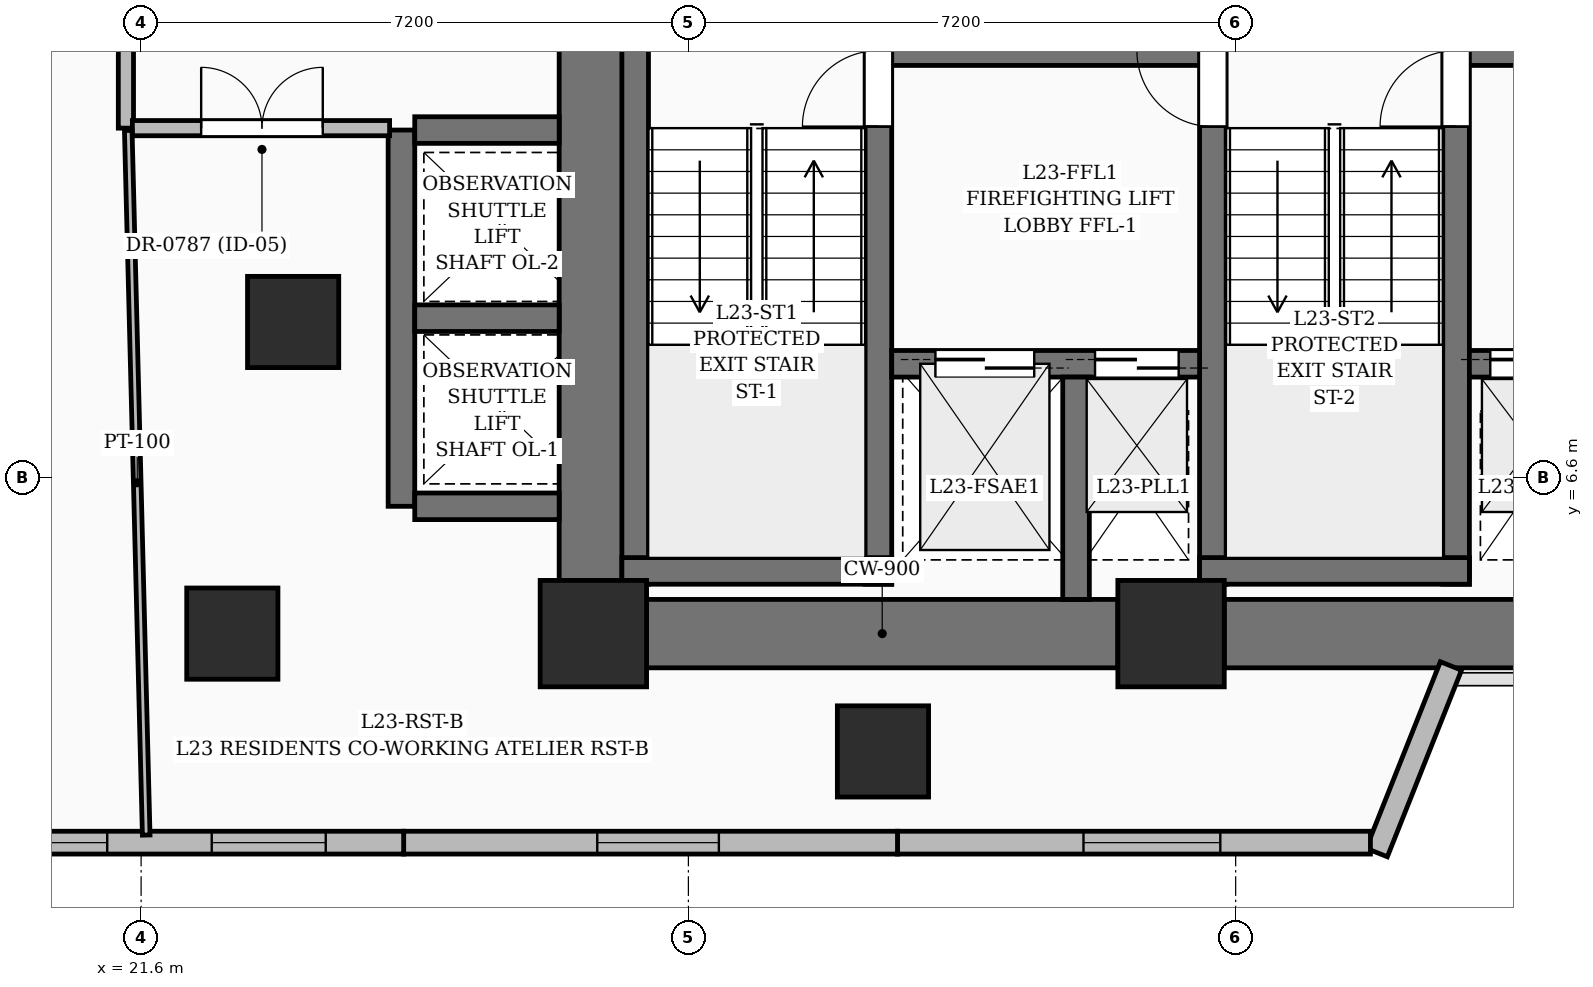
"""IFC4 building model, lengths in metres.
Left out: names, types, materials, properties, quantities, classifications, styles, units other than length and angle.
Written with IfcOpenShell. Run it as: python <this file> out.ifc"""

import sys

from ifc_helpers import new_model, si_unit, direction, frame, frame_2d, origin, origin_2d, place, context, subcontext, project, spatial, rectangle, extrude, element, fill, save


model = new_model("IFC4")
c1 = context("Model", 3, precision=1e-05, world=origin(), true_north=direction((0.0, 1.0)))
c2 = subcontext(c1, "Body", "Model", "MODEL_VIEW")
j1 = project(units=[si_unit("LENGTHUNIT", "METRE"), si_unit("PLANEANGLEUNIT", "RADIAN")], contexts=[c1])
p1 = place(None, origin())
s1 = spatial("IfcSite", under=j1, at=p1, CompositionType="ELEMENT")
p2 = place(p1, origin())
s2 = spatial("IfcBuilding", under=s1, at=p2, CompositionType="ELEMENT")
p3 = place(p2, frame((0.0, 0.0, 93.0)))
s3 = spatial("IfcBuildingStorey", under=s2, at=p3, CompositionType="ELEMENT", Elevation=93.0)
for number, where, z_axis, x_axis in (
    (1, (27.55, 4.55, 0.0), (0.0, 0.0, 1.0), (1.0, 0.0, 0.0)),
    (2, (35.15, 4.55, 0.0), (0.0, 0.0, 1.0), (1.0, 0.0, 0.0)),
):
    element("IfcColumn", number, at=place(p3, frame(where, z_axis=z_axis, x_axis=x_axis)), inside=s3, PredefinedType="COLUMN", context=c2, shape_type="SweptSolid", body=[
        extrude(rectangle(XDim=1.4, YDim=1.4, at=origin_2d()), origin(), (0.0, 0.0, 1.0), 3.6),
    ])
for number, where, z_axis, x_axis in (
    (3, (22.8, 4.55, 0.0), (0.0, 0.0, 1.0), (1.0, 0.0, 0.0)),
    (4, (23.6, 8.65, 0.0), (0.0, 0.0, 1.0), (1.0, 0.0, 0.0)),
):
    element("IfcColumn", number, at=place(p3, frame(where, z_axis=z_axis, x_axis=x_axis)), inside=s3, PredefinedType="COLUMN", context=c2, shape_type="SweptSolid", body=[
        extrude(rectangle(XDim=1.2, YDim=1.2, at=origin_2d()), origin(), (0.0, 0.0, 1.0), 3.6),
    ])
p4 = place(p3, frame((28.25, 4.55, 0.0), z_axis=(0.0, 0.0, 1.0), x_axis=(1.0, 0.0, 0.0)))
e5 = element("IfcWall", 5, at=p4, inside=s3, PredefinedType="SHEAR", context=c2, shape_type="SweptSolid", body=[
    extrude(rectangle(XDim=6.2, YDim=0.9, at=frame_2d((3.1, 0.0))), origin(), (0.0, 0.0, 1.0), 3.6),
])
p5 = place(p3, frame((35.85, 4.55, 0.0), z_axis=(0.0, 0.0, 1.0), x_axis=(1.0, 0.0, 0.0)))
e6 = element("IfcWall", 6, at=p5, inside=s3, PredefinedType="SHEAR", context=c2, shape_type="SweptSolid", body=[
    extrude(rectangle(XDim=10.5, YDim=0.9, at=frame_2d((5.25, 0.0))), origin(), (0.0, 0.0, 1.0), 3.6),
])
p6 = place(p3, frame((27.55, 5.25, 0.0), z_axis=(0.0, 0.0, 1.0), x_axis=(0.0, 1.0, 0.0)))
e7 = element("IfcWall", 7, at=p6, inside=s3, PredefinedType="SHEAR", context=c2, shape_type="SweptSolid", body=[
    extrude(rectangle(XDim=8.8, YDim=0.9, at=frame_2d((4.4, 0.0))), origin(), (0.0, 0.0, 1.0), 3.6),
])
p7 = place(p3, frame((28.1, 5.2, 0.0), z_axis=(0.0, 0.0, 1.0), x_axis=(0.0, 1.0, 0.0)))
e8 = element("IfcWall", 8, at=p7, inside=s3, PredefinedType="SOLIDWALL", context=c2, shape_type="SweptSolid", body=[
    extrude(rectangle(XDim=9.1, YDim=0.35, at=frame_2d((4.55, 0.0))), origin(), (0.0, 0.0, 1.0), 3.6),
])
p8 = place(p3, frame((31.3, 5.2, 0.0), z_axis=(0.0, 0.0, 1.0), x_axis=(0.0, 1.0, 0.0)))
e9 = element("IfcWall", 9, at=p8, inside=s3, PredefinedType="SOLIDWALL", context=c2, shape_type="SweptSolid", body=[
    extrude(rectangle(XDim=9.1, YDim=0.35, at=frame_2d((4.55, 0.0))), origin(), (0.0, 0.0, 1.0), 3.6),
])
p9 = place(p8, frame((6.02, 0.0, 0.0)))
e10 = element("IfcOpeningElement", 10, at=p9, cuts=e9, PredefinedType="OPENING", context=c2, shape_type="SweptSolid", body=[
    extrude(rectangle(XDim=1.0, YDim=2.15, at=frame_2d((0.5, 1.075))), frame((0.0, 0.185, 0.0), z_axis=(0.0, -1.0, 0.0), x_axis=(1.0, 0.0, 0.0)), (0.0, 0.0, 1.0), 0.37),
])
p10 = place(p3, frame((27.925, 5.375, 0.0), z_axis=(0.0, 0.0, 1.0), x_axis=(1.0, 0.0, 0.0)))
e11 = element("IfcWall", 11, at=p10, inside=s3, PredefinedType="SOLIDWALL", context=c2, shape_type="SweptSolid", body=[
    extrude(rectangle(XDim=3.55, YDim=0.35, at=frame_2d((1.775, 0.0))), origin(), (0.0, 0.0, 1.0), 3.6),
])
p11 = place(p3, frame((35.7, 5.2, 0.0), z_axis=(0.0, 0.0, 1.0), x_axis=(0.0, 1.0, 0.0)))
e12 = element("IfcWall", 12, at=p11, inside=s3, PredefinedType="SOLIDWALL", context=c2, shape_type="SweptSolid", body=[
    extrude(rectangle(XDim=9.1, YDim=0.35, at=frame_2d((4.55, 0.0))), origin(), (0.0, 0.0, 1.0), 3.6),
])
p12 = place(p11, frame((6.02, 0.0, 0.0)))
e13 = element("IfcOpeningElement", 13, at=p12, cuts=e12, PredefinedType="OPENING", context=c2, shape_type="SweptSolid", body=[
    extrude(rectangle(XDim=1.0, YDim=2.15, at=frame_2d((0.5, 1.075))), frame((0.0, 0.185, 0.0), z_axis=(0.0, -1.0, 0.0), x_axis=(1.0, 0.0, 0.0)), (0.0, 0.0, 1.0), 0.37),
])
p13 = place(p3, frame((38.9, 5.2, 0.0), z_axis=(0.0, 0.0, 1.0), x_axis=(0.0, 1.0, 0.0)))
e14 = element("IfcWall", 14, at=p13, inside=s3, PredefinedType="SOLIDWALL", context=c2, shape_type="SweptSolid", body=[
    extrude(rectangle(XDim=9.1, YDim=0.35, at=frame_2d((4.55, 0.0))), origin(), (0.0, 0.0, 1.0), 3.6),
])
p14 = place(p13, frame((6.02, 0.0, 0.0)))
e15 = element("IfcOpeningElement", 15, at=p14, cuts=e14, PredefinedType="OPENING", context=c2, shape_type="SweptSolid", body=[
    extrude(rectangle(XDim=1.0, YDim=2.15, at=frame_2d((0.5, 1.075))), frame((0.0, 0.185, 0.0), z_axis=(0.0, -1.0, 0.0), x_axis=(1.0, 0.0, 0.0)), (0.0, 0.0, 1.0), 0.37),
])
p15 = place(p3, frame((35.525, 5.375, 0.0), z_axis=(0.0, 0.0, 1.0), x_axis=(1.0, 0.0, 0.0)))
e16 = element("IfcWall", 16, at=p15, inside=s3, PredefinedType="SOLIDWALL", context=c2, shape_type="SweptSolid", body=[
    extrude(rectangle(XDim=3.55, YDim=0.35, at=frame_2d((1.775, 0.0))), origin(), (0.0, 0.0, 1.0), 3.6),
])
p16 = place(p3, frame((31.475, 8.1, 0.0), z_axis=(0.0, 0.0, 1.0), x_axis=(1.0, 0.0, 0.0)))
e17 = element("IfcWall", 17, at=p16, inside=s3, PredefinedType="SOLIDWALL", context=c2, shape_type="SweptSolid", body=[
    extrude(rectangle(XDim=4.05, YDim=0.35, at=frame_2d((2.025, 0.0))), origin(), (0.0, 0.0, 1.0), 3.6),
])
p17 = place(p16, frame((0.575, 0.0, 0.0)))
e18 = element("IfcOpeningElement", 18, at=p17, cuts=e17, PredefinedType="OPENING", context=c2, shape_type="SweptSolid", body=[
    extrude(rectangle(XDim=1.3, YDim=2.25, at=frame_2d((0.65, 1.125))), frame((0.0, 0.185, 0.0), z_axis=(0.0, -1.0, 0.0), x_axis=(1.0, 0.0, 0.0)), (0.0, 0.0, 1.0), 0.37),
])
p18 = place(p16, frame((2.675, 0.0, 0.0)))
e19 = element("IfcOpeningElement", 19, at=p18, cuts=e17, PredefinedType="OPENING", context=c2, shape_type="SweptSolid", body=[
    extrude(rectangle(XDim=1.1, YDim=2.2, at=frame_2d((0.55, 1.1))), frame((0.0, 0.185, 0.0), z_axis=(0.0, -1.0, 0.0), x_axis=(1.0, 0.0, 0.0)), (0.0, 0.0, 1.0), 0.37),
])
p19 = place(p3, frame((39.075, 8.1, 0.0), z_axis=(0.0, 0.0, 1.0), x_axis=(1.0, 0.0, 0.0)))
e20 = element("IfcWall", 20, at=p19, inside=s3, PredefinedType="SOLIDWALL", context=c2, shape_type="SweptSolid", body=[
    extrude(rectangle(XDim=4.05, YDim=0.35, at=frame_2d((2.025, 0.0))), origin(), (0.0, 0.0, 1.0), 3.6),
])
p20 = place(p19, frame((2.175, 0.0, 0.0)))
e21 = element("IfcOpeningElement", 21, at=p20, cuts=e20, PredefinedType="OPENING", context=c2, shape_type="SweptSolid", body=[
    extrude(rectangle(XDim=1.3, YDim=2.25, at=frame_2d((0.65, 1.125))), frame((0.0, 0.185, 0.0), z_axis=(0.0, -1.0, 0.0), x_axis=(1.0, 0.0, 0.0)), (0.0, 0.0, 1.0), 0.37),
])
p21 = place(p19, frame((0.275, 0.0, 0.0)))
e22 = element("IfcOpeningElement", 22, at=p21, cuts=e20, PredefinedType="OPENING", context=c2, shape_type="SweptSolid", body=[
    extrude(rectangle(XDim=1.1, YDim=2.2, at=frame_2d((0.55, 1.1))), frame((0.0, 0.185, 0.0), z_axis=(0.0, -1.0, 0.0), x_axis=(1.0, 0.0, 0.0)), (0.0, 0.0, 1.0), 0.37),
])
p22 = place(p3, frame((33.9, 5.0, 0.0), z_axis=(0.0, 0.0, 1.0), x_axis=(0.0, 1.0, 0.0)))
e23 = element("IfcWall", 23, at=p22, inside=s3, PredefinedType="SOLIDWALL", context=c2, shape_type="SweptSolid", body=[
    extrude(rectangle(XDim=2.925, YDim=0.35, at=frame_2d((1.462, 0.0))), origin(), (0.0, 0.0, 1.0), 3.6),
])
p23 = place(p3, frame((31.475, 12.2, 0.0), z_axis=(0.0, 0.0, 1.0), x_axis=(1.0, 0.0, 0.0)))
e24 = element("IfcWall", 24, at=p23, inside=s3, PredefinedType="SOLIDWALL", context=c2, shape_type="SweptSolid", body=[
    extrude(rectangle(XDim=4.05, YDim=0.35, at=frame_2d((2.025, 0.0))), origin(), (0.0, 0.0, 1.0), 3.6),
])
p24 = place(p3, frame((39.075, 12.2, 0.0), z_axis=(0.0, 0.0, 1.0), x_axis=(1.0, 0.0, 0.0)))
e25 = element("IfcWall", 25, at=p24, inside=s3, PredefinedType="SOLIDWALL", context=c2, shape_type="SweptSolid", body=[
    extrude(rectangle(XDim=4.05, YDim=0.35, at=frame_2d((2.025, 0.0))), origin(), (0.0, 0.0, 1.0), 3.6),
])
p25 = place(p3, frame((25.025, 6.225, 0.0), z_axis=(0.0, 0.0, 1.0), x_axis=(0.0, 1.0, 0.0)))
e26 = element("IfcWall", 26, at=p25, inside=s3, PredefinedType="SOLIDWALL", context=c2, shape_type="SweptSolid", body=[
    extrude(rectangle(XDim=4.95, YDim=0.35, at=frame_2d((2.475, 0.0))), origin(), (0.0, 0.0, 1.0), 3.6),
])
for number, where, z_axis, x_axis in (
    (27, (25.2, 6.225, 0.0), (0.0, 0.0, 1.0), (1.0, 0.0, 0.0)),
    (28, (25.2, 8.7, 0.0), (0.0, 0.0, 1.0), (1.0, 0.0, 0.0)),
    (29, (25.2, 11.175, 0.0), (0.0, 0.0, 1.0), (1.0, 0.0, 0.0)),
):
    element("IfcWall", number, at=place(p3, frame(where, z_axis=z_axis, x_axis=x_axis)), inside=s3, PredefinedType="SOLIDWALL", context=c2, shape_type="SweptSolid", body=[
        extrude(rectangle(XDim=1.9, YDim=0.35, at=frame_2d((0.95, 0.0))), origin(), (0.0, 0.0, 1.0), 3.6),
    ])
p26 = place(p3, frame((31.36, 3.0, 0.0), z_axis=(0.0, 0.0, 1.0), x_axis=(1.0, 0.0, 0.0)))
e30 = element("IfcColumn", 30, at=p26, inside=s3, PredefinedType="COLUMN", context=c2, shape_type="SweptSolid", body=[
    extrude(rectangle(XDim=1.2, YDim=1.2, at=origin_2d()), origin(), (0.0, 0.0, 1.0), 3.6),
])
p27 = place(p3, frame((38.833, 4.125, 0.0), z_axis=(0.0, 0.0, 1.0), x_axis=(-0.369557636099, -0.929207809696, 0.0)))
e31 = element("IfcWall", 31, at=p27, inside=s3, PredefinedType="SOLIDWALL", context=c2, shape_type="SweptSolid", body=[
    extrude(rectangle(XDim=2.642, YDim=0.3, at=frame_2d((1.321, 0.0))), origin(), (0.0, 0.0, 1.0), 2.35),
])
p28 = place(p3, frame((37.773, 1.8, 0.0), z_axis=(0.0, 0.0, 1.0), x_axis=(-1.0, 0.0, 0.0)))
e32 = element("IfcWall", 32, at=p28, inside=s3, PredefinedType="SOLIDWALL", context=c2, shape_type="SweptSolid", body=[
    extrude(rectangle(XDim=6.222, YDim=0.3, at=frame_2d((3.111, 0.0))), origin(), (0.0, 0.0, 1.0), 3.35),
])
p29 = place(p28, frame((1.975, 0.0, 0.6)))
e33 = element("IfcOpeningElement", 33, at=p29, cuts=e32, PredefinedType="OPENING", context=c2, shape_type="SweptSolid", body=[
    extrude(rectangle(XDim=1.8, YDim=2.1, at=frame_2d((0.9, 1.05))), frame((0.0, 0.16, 0.0), z_axis=(0.0, -1.0, 0.0), x_axis=(1.0, 0.0, 0.0)), (0.0, 0.0, 1.0), 0.32),
])
p30 = place(p3, frame((31.551, 1.8, 0.0), z_axis=(0.0, 0.0, 1.0), x_axis=(-1.0, 0.0, 0.0)))
e34 = element("IfcWall", 34, at=p30, inside=s3, PredefinedType="SOLIDWALL", context=c2, shape_type="SweptSolid", body=[
    extrude(rectangle(XDim=6.497, YDim=0.3, at=frame_2d((3.249, 0.0))), origin(), (0.0, 0.0, 1.0), 3.35),
])
p31 = place(p30, frame((2.35, 0.0, 0.55)))
e35 = element("IfcOpeningElement", 35, at=p31, cuts=e34, PredefinedType="OPENING", context=c2, shape_type="SweptSolid", body=[
    extrude(rectangle(XDim=1.6, YDim=2.2, at=frame_2d((0.8, 1.1))), frame((0.0, 0.16, 0.0), z_axis=(0.0, -1.0, 0.0), x_axis=(1.0, 0.0, 0.0)), (0.0, 0.0, 1.0), 0.32),
])
p32 = place(p3, frame((25.054, 1.8, 0.0), z_axis=(0.0, 0.0, 1.0), x_axis=(-1.0, 0.0, 0.0)))
e36 = element("IfcWall", 36, at=p32, inside=s3, PredefinedType="SOLIDWALL", context=c2, shape_type="SweptSolid", body=[
    extrude(rectangle(XDim=6.497, YDim=0.3, at=frame_2d((3.249, 0.0))), origin(), (0.0, 0.0, 1.0), 3.35),
])
p33 = place(p32, frame((3.9, 0.0, 0.6)))
e37 = element("IfcOpeningElement", 37, at=p33, cuts=e36, PredefinedType="OPENING", context=c2, shape_type="SweptSolid", body=[
    extrude(rectangle(XDim=1.5, YDim=2.1, at=frame_2d((0.75, 1.05))), frame((0.0, 0.16, 0.0), z_axis=(0.0, -1.0, 0.0), x_axis=(1.0, 0.0, 0.0)), (0.0, 0.0, 1.0), 0.32),
])
p34 = place(p32, frame((1.025, 0.0, 0.6)))
e38 = element("IfcOpeningElement", 38, at=p34, cuts=e36, PredefinedType="OPENING", context=c2, shape_type="SweptSolid", body=[
    extrude(rectangle(XDim=1.5, YDim=2.1, at=frame_2d((0.75, 1.05))), frame((0.0, 0.16, 0.0), z_axis=(0.0, -1.0, 0.0), x_axis=(1.0, 0.0, 0.0)), (0.0, 0.0, 1.0), 0.32),
])
p35 = place(p3, frame((21.4, 16.67, 0.0), z_axis=(0.0, 0.0, 1.0), x_axis=(0.0, -1.0, 0.0)))
e39 = element("IfcWall", 39, at=p35, inside=s3, PredefinedType="PARTITIONING", context=c2, shape_type="SweptSolid", body=[
    extrude(rectangle(XDim=5.47, YDim=0.2, at=frame_2d((2.735, 0.0))), origin(), (0.0, 0.0, 1.0), 2.787),
])
p36 = place(p35, frame((1.86, 0.0, 0.0)))
e40 = element("IfcOpeningElement", 40, at=p36, cuts=e39, PredefinedType="OPENING", context=c2, shape_type="SweptSolid", body=[
    extrude(rectangle(XDim=1.6, YDim=2.3, at=frame_2d((0.8, 1.15))), frame((0.0, 0.11, 0.0), z_axis=(0.0, -1.0, 0.0), x_axis=(1.0, 0.0, 0.0)), (0.0, 0.0, 1.0), 0.22),
])
p37 = place(p3, frame((21.485, 11.2, 0.0), z_axis=(0.0, 0.0, 1.0), x_axis=(1.0, 0.0, 0.0)))
e41 = element("IfcWall", 41, at=p37, inside=s3, PredefinedType="PARTITIONING", context=c2, shape_type="SweptSolid", body=[
    extrude(rectangle(XDim=3.384, YDim=0.2, at=frame_2d((1.692, 0.0))), origin(), (0.0, 0.0, 1.0), 3.35),
])
p38 = place(p37, frame((0.905, 0.0, 0.0)))
e42 = element("IfcOpeningElement", 42, at=p38, cuts=e41, PredefinedType="OPENING", context=c2, shape_type="SweptSolid", body=[
    extrude(rectangle(XDim=1.6, YDim=2.3, at=frame_2d((0.8, 1.15))), frame((0.0, 0.11, 0.0), z_axis=(0.0, -1.0, 0.0), x_axis=(1.0, 0.0, 0.0)), (0.0, 0.0, 1.0), 0.22),
])
p39 = place(p3, frame((21.667, 1.9, 0.0), z_axis=(0.0, 0.0, 1.0), x_axis=(-0.025459219334, 0.999675861543, 0.0)))
e43 = element("IfcWall", 43, at=p39, inside=s3, PredefinedType="PARTITIONING", context=c2, shape_type="SweptSolid", body=[
    extrude(rectangle(XDim=9.273, YDim=0.1, at=frame_2d((4.636, 0.0))), origin(), (0.0, 0.0, 1.0), 2.345),
])
p40 = place(p3, frame((21.34, 16.76, 0.0), z_axis=(0.0, 0.0, 1.0), x_axis=(-0.70674642835, -0.707466950475, 0.0)))
e44 = element("IfcWall", 44, at=p40, inside=s3, PredefinedType="PARTITIONING", context=c2, shape_type="SweptSolid", body=[
    extrude(rectangle(XDim=14.231, YDim=0.175, at=frame_2d((7.116, 0.0))), origin(), (0.0, 0.0, 1.0), 2.345),
])
p41 = place(p40, frame((6.648, 0.0, 0.0)))
e45 = element("IfcOpeningElement", 45, at=p41, cuts=e44, PredefinedType="OPENING", context=c2, shape_type="SweptSolid", body=[
    extrude(rectangle(XDim=0.95, YDim=2.2, at=frame_2d((0.475, 1.1))), frame((0.0, 0.097, 0.0), z_axis=(0.0, -1.0, 0.0), x_axis=(1.0, 0.0, 0.0)), (0.0, 0.0, 1.0), 0.195),
])
p42 = place(p29, origin())
e46 = element("IfcWindow", 46, at=p42, inside=s3, PartitioningType="SINGLE_PANEL", PredefinedType="WINDOW", context=c2, shape_type="SweptSolid", body=[
    extrude(rectangle(XDim=1.8, YDim=2.1, at=frame_2d((0.9, 1.05))), frame((0.0, 0.03, 0.0), z_axis=(0.0, -1.0, 0.0), x_axis=(1.0, 0.0, 0.0)), (0.0, 0.0, 1.0), 0.06),
])
fill(e33, e46)
p43 = place(p31, origin())
e47 = element("IfcWindow", 47, at=p43, inside=s3, PartitioningType="SINGLE_PANEL", PredefinedType="WINDOW", context=c2, shape_type="SweptSolid", body=[
    extrude(rectangle(XDim=1.6, YDim=2.2, at=frame_2d((0.8, 1.1))), frame((0.0, 0.03, 0.0), z_axis=(0.0, -1.0, 0.0), x_axis=(1.0, 0.0, 0.0)), (0.0, 0.0, 1.0), 0.06),
])
fill(e35, e47)
p44 = place(p33, origin())
e48 = element("IfcWindow", 48, at=p44, inside=s3, PartitioningType="SINGLE_PANEL", PredefinedType="WINDOW", context=c2, shape_type="SweptSolid", body=[
    extrude(rectangle(XDim=1.5, YDim=2.1, at=frame_2d((0.75, 1.05))), frame((0.0, 0.03, 0.0), z_axis=(0.0, -1.0, 0.0), x_axis=(1.0, 0.0, 0.0)), (0.0, 0.0, 1.0), 0.06),
])
fill(e37, e48)
p45 = place(p34, origin())
e49 = element("IfcWindow", 49, at=p45, inside=s3, PartitioningType="SINGLE_PANEL", PredefinedType="WINDOW", context=c2, shape_type="SweptSolid", body=[
    extrude(rectangle(XDim=1.5, YDim=2.1, at=frame_2d((0.75, 1.05))), frame((0.0, 0.03, 0.0), z_axis=(0.0, -1.0, 0.0), x_axis=(1.0, 0.0, 0.0)), (0.0, 0.0, 1.0), 0.06),
])
fill(e38, e49)
p46 = place(p9, origin())
e50 = element("IfcDoor", 50, at=p46, inside=s3, OperationType="SINGLE_SWING_LEFT", PredefinedType="DOOR", context=c2, shape_type="SweptSolid", body=[
    extrude(rectangle(XDim=1.0, YDim=2.15, at=frame_2d((0.5, 1.075))), frame((0.0, 0.025, 0.0), z_axis=(0.0, -1.0, 0.0), x_axis=(1.0, 0.0, 0.0)), (0.0, 0.0, 1.0), 0.05),
])
fill(e10, e50)
p47 = place(p12, origin())
e51 = element("IfcDoor", 51, at=p47, inside=s3, OperationType="SINGLE_SWING_RIGHT", PredefinedType="DOOR", context=c2, shape_type="SweptSolid", body=[
    extrude(rectangle(XDim=1.0, YDim=2.15, at=frame_2d((0.5, 1.075))), frame((0.0, 0.025, 0.0), z_axis=(0.0, -1.0, 0.0), x_axis=(1.0, 0.0, 0.0)), (0.0, 0.0, 1.0), 0.05),
])
fill(e13, e51)
p48 = place(p14, origin())
e52 = element("IfcDoor", 52, at=p48, inside=s3, OperationType="SINGLE_SWING_LEFT", PredefinedType="DOOR", context=c2, shape_type="SweptSolid", body=[
    extrude(rectangle(XDim=1.0, YDim=2.15, at=frame_2d((0.5, 1.075))), frame((0.0, 0.025, 0.0), z_axis=(0.0, -1.0, 0.0), x_axis=(1.0, 0.0, 0.0)), (0.0, 0.0, 1.0), 0.05),
])
fill(e15, e52)
p49 = place(p17, origin())
e53 = element("IfcDoor", 53, at=p49, inside=s3, OperationType="DOUBLE_DOOR_SLIDING", PredefinedType="DOOR", context=c2, shape_type="SweptSolid", body=[
    extrude(rectangle(XDim=1.3, YDim=2.25, at=frame_2d((0.65, 1.125))), frame((0.0, 0.025, 0.0), z_axis=(0.0, -1.0, 0.0), x_axis=(1.0, 0.0, 0.0)), (0.0, 0.0, 1.0), 0.05),
])
fill(e18, e53)
p50 = place(p18, origin())
e54 = element("IfcDoor", 54, at=p50, inside=s3, OperationType="DOUBLE_DOOR_SLIDING", PredefinedType="DOOR", context=c2, shape_type="SweptSolid", body=[
    extrude(rectangle(XDim=1.1, YDim=2.2, at=frame_2d((0.55, 1.1))), frame((0.0, 0.025, 0.0), z_axis=(0.0, -1.0, 0.0), x_axis=(1.0, 0.0, 0.0)), (0.0, 0.0, 1.0), 0.05),
])
fill(e19, e54)
p51 = place(p21, origin())
e55 = element("IfcDoor", 55, at=p51, inside=s3, OperationType="DOUBLE_DOOR_SLIDING", PredefinedType="DOOR", context=c2, shape_type="SweptSolid", body=[
    extrude(rectangle(XDim=1.1, YDim=2.2, at=frame_2d((0.55, 1.1))), frame((0.0, 0.025, 0.0), z_axis=(0.0, -1.0, 0.0), x_axis=(1.0, 0.0, 0.0)), (0.0, 0.0, 1.0), 0.05),
])
fill(e22, e55)
p52 = place(p38, origin())
e56 = element("IfcDoor", 56, at=p52, inside=s3, OperationType="DOUBLE_DOOR_SINGLE_SWING", PredefinedType="DOOR", context=c2, shape_type="SweptSolid", body=[
    extrude(rectangle(XDim=1.6, YDim=2.3, at=frame_2d((0.8, 1.15))), frame((0.0, 0.025, 0.0), z_axis=(0.0, -1.0, 0.0), x_axis=(1.0, 0.0, 0.0)), (0.0, 0.0, 1.0), 0.05),
])
fill(e42, e56)
save(model, sys.argv[1])
